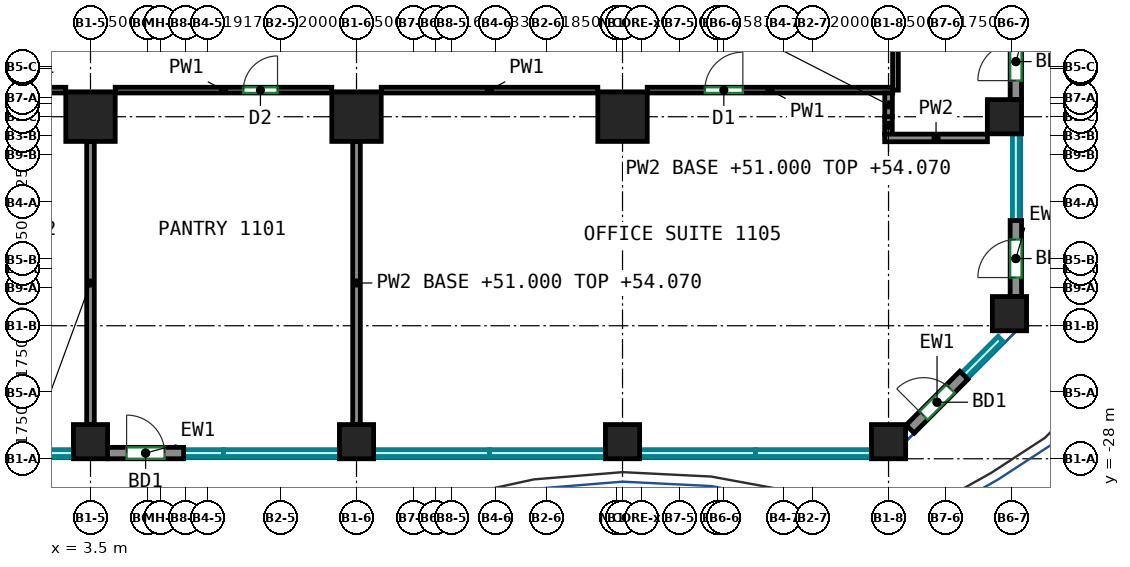
"""IFC4 building model, lengths in metres.
Left out: names, types, materials, properties, quantities, classifications, styles, units other than length and angle.
Written with IfcOpenShell. Run it as: python <this file> out.ifc"""

import sys

from ifc_helpers import new_model, si_unit, direction, frame, frame_2d, origin, origin_2d, place, context, subcontext, project, spatial, rectangle, extrude, source, transform, mapped, element, fill, save


model = new_model("IFC4")
c1 = context("Model", 3, precision=1e-05, world=origin(), true_north=direction((0.0, 1.0)))
c2 = subcontext(c1, "Body", "Model", "MODEL_VIEW")
j1 = project(units=[si_unit("LENGTHUNIT", "METRE"), si_unit("PLANEANGLEUNIT", "RADIAN")], contexts=[c1])
p1 = place(None, origin())
s1 = spatial("IfcSite", under=j1, at=p1, CompositionType="ELEMENT")
p2 = place(p1, origin())
s2 = spatial("IfcBuilding", under=s1, at=p2, CompositionType="ELEMENT")
p3 = place(p2, frame((0.0, 0.0, 51.0)))
s3 = spatial("IfcBuildingStorey", under=s2, at=p3, CompositionType="ELEMENT", Elevation=51.0)
m1 = source(origin(), c2, "Body", "SweptSolid", [
    extrude(rectangle(XDim=0.9, YDim=0.9, at=origin_2d()), origin(), (0.0, 0.0, 1.0), 3.72),
])
p4 = place(p3, frame((3.5, -27.55, 0.0), z_axis=(0.0, 0.0, 1.0), x_axis=(1.0, 0.0, 0.0)))
e1 = element("IfcColumn", 1, at=p4, inside=s3, PredefinedType="COLUMN", context=c2, shape_type="MappedRepresentation", body=[
    mapped(m1, transform((0.0, 0.0, 0.0))),
])
m2 = source(origin(), c2, "Body", "SweptSolid", [
    extrude(rectangle(XDim=1.3, YDim=1.3, at=origin_2d()), origin(), (0.0, 0.0, 1.0), 3.72),
])
p5 = place(p3, frame((3.5, -19.0, 0.0), z_axis=(0.0, 0.0, 1.0), x_axis=(1.0, 0.0, 0.0)))
e2 = element("IfcColumn", 2, at=p5, inside=s3, PredefinedType="COLUMN", context=c2, shape_type="MappedRepresentation", body=[
    mapped(m2, transform((0.0, 0.0, 0.0))),
])
p6 = place(p3, frame((10.5, -27.55, 0.0), z_axis=(0.0, 0.0, 1.0), x_axis=(1.0, 0.0, 0.0)))
e3 = element("IfcColumn", 3, at=p6, inside=s3, PredefinedType="COLUMN", context=c2, shape_type="MappedRepresentation", body=[
    mapped(m1, transform((0.0, 0.0, 0.0))),
])
p7 = place(p3, frame((10.5, -19.0, 0.0), z_axis=(0.0, 0.0, 1.0), x_axis=(1.0, 0.0, 0.0)))
e4 = element("IfcColumn", 4, at=p7, inside=s3, PredefinedType="COLUMN", context=c2, shape_type="MappedRepresentation", body=[
    mapped(m2, transform((0.0, 0.0, 0.0))),
])
p8 = place(p3, frame((17.5, -27.55, 0.0), z_axis=(0.0, 0.0, 1.0), x_axis=(1.0, 0.0, 0.0)))
e5 = element("IfcColumn", 5, at=p8, inside=s3, PredefinedType="COLUMN", context=c2, shape_type="MappedRepresentation", body=[
    mapped(m1, transform((0.0, 0.0, 0.0))),
])
p9 = place(p3, frame((17.5, -19.0, 0.0), z_axis=(0.0, 0.0, 1.0), x_axis=(1.0, 0.0, 0.0)))
e6 = element("IfcColumn", 6, at=p9, inside=s3, PredefinedType="COLUMN", context=c2, shape_type="MappedRepresentation", body=[
    mapped(m2, transform((0.0, 0.0, 0.0))),
])
for number, where, z_axis, x_axis in (
    (7, (24.5, -27.55, 0.0), (0.0, 0.0, 1.0), (1.0, 0.0, 0.0)),
    (8, (27.55, -19.0, 0.0), (0.0, 0.0, 1.0), (1.0, 0.0, 0.0)),
    (9, (27.682, -24.182, 0.0), (0.0, 0.0, 1.0), (1.0, 0.0, 0.0)),
):
    element("IfcColumn", number, at=place(p3, frame(where, z_axis=z_axis, x_axis=x_axis)), inside=s3, PredefinedType="COLUMN", context=c2, shape_type="MappedRepresentation", body=[
        mapped(m1, transform((0.0, 0.0, 0.0))),
    ])
m3 = source(origin(), c2, "Body", "SweptSolid", [
    extrude(rectangle(XDim=2.0, YDim=0.3, at=frame_2d((1.0, 0.0))), origin(), (0.0, 0.0, 1.0), 3.72),
])
p10 = place(p3, frame((3.95, -27.85, 0.0), z_axis=(0.0, 0.0, 1.0), x_axis=(1.0, 0.0, 0.0)))
e10 = element("IfcWall", 10, at=p10, inside=s3, PredefinedType="SOLIDWALL", context=c2, shape_type="MappedRepresentation", body=[
    mapped(m3, transform((0.0, 0.0, 0.0))),
])
p11 = place(p10, frame((0.5, 0.0, 0.0)))
e11 = element("IfcOpeningElement", 11, at=p11, cuts=e10, PredefinedType="OPENING", context=c2, shape_type="SweptSolid", body=[
    extrude(rectangle(XDim=1.0, YDim=2.1, at=frame_2d((0.5, 1.05))), frame((0.0, 0.16, 0.0), z_axis=(0.0, -1.0, 0.0), x_axis=(1.0, 0.0, 0.0)), (0.0, 0.0, 1.0), 0.32),
])
m4 = source(origin(), c2, "Body", "SweptSolid", [
    extrude(rectangle(XDim=2.0, YDim=0.3, at=frame_2d((1.0, 0.0))), origin(), (0.0, 0.0, 1.0), 3.72),
])
p12 = place(p3, frame((25.069, -27.219, 0.0), z_axis=(0.0, 0.0, 1.0), x_axis=(0.707106781187, 0.707106781187, 0.0)))
e12 = element("IfcWall", 12, at=p12, inside=s3, PredefinedType="SOLIDWALL", context=c2, shape_type="MappedRepresentation", body=[
    mapped(m4, transform((0.0, 0.0, 0.0))),
])
p13 = place(p12, frame((0.5, 0.0, 0.0)))
e13 = element("IfcOpeningElement", 13, at=p13, cuts=e12, PredefinedType="OPENING", context=c2, shape_type="SweptSolid", body=[
    extrude(rectangle(XDim=1.0, YDim=2.1, at=frame_2d((0.5, 1.05))), frame((0.0, 0.16, 0.0), z_axis=(0.0, -1.0, 0.0), x_axis=(1.0, 0.0, 0.0)), (0.0, 0.0, 1.0), 0.32),
])
p14 = place(p3, frame((27.85, -23.732, 0.0), z_axis=(0.0, 0.0, 1.0), x_axis=(0.0, 1.0, 0.0)))
e14 = element("IfcWall", 14, at=p14, inside=s3, PredefinedType="SOLIDWALL", context=c2, shape_type="MappedRepresentation", body=[
    mapped(m3, transform((0.0, 0.0, 0.0))),
])
p15 = place(p14, frame((0.5, 0.0, 0.0)))
e15 = element("IfcOpeningElement", 15, at=p15, cuts=e14, PredefinedType="OPENING", context=c2, shape_type="SweptSolid", body=[
    extrude(rectangle(XDim=1.0, YDim=2.1, at=frame_2d((0.5, 1.05))), frame((0.0, 0.16, 0.0), z_axis=(0.0, -1.0, 0.0), x_axis=(1.0, 0.0, 0.0)), (0.0, 0.0, 1.0), 0.32),
])
p16 = place(p3, frame((27.85, -18.55, 0.0), z_axis=(0.0, 0.0, 1.0), x_axis=(0.0, 1.0, 0.0)))
e16 = element("IfcWall", 16, at=p16, inside=s3, PredefinedType="SOLIDWALL", context=c2, shape_type="MappedRepresentation", body=[
    mapped(m3, transform((0.0, 0.0, 0.0))),
])
p17 = place(p16, frame((0.5, 0.0, 0.0)))
e17 = element("IfcOpeningElement", 17, at=p17, cuts=e16, PredefinedType="OPENING", context=c2, shape_type="SweptSolid", body=[
    extrude(rectangle(XDim=1.0, YDim=2.1, at=frame_2d((0.5, 1.05))), frame((0.0, 0.16, 0.0), z_axis=(0.0, -1.0, 0.0), x_axis=(1.0, 0.0, 0.0)), (0.0, 0.0, 1.0), 0.32),
])
p18 = place(p3, frame((-2.85, -18.3, 0.0), z_axis=(0.0, 0.0, 1.0), x_axis=(1.0, 0.0, 0.0)))
e18 = element("IfcWall", 18, at=p18, inside=s3, PredefinedType="PARTITIONING", context=c2, shape_type="SweptSolid", body=[
    extrude(rectangle(XDim=5.7, YDim=0.15, at=frame_2d((2.85, 0.0))), origin(), (0.0, 0.0, 1.0), 3.72),
])
p19 = place(p18, frame((1.837, 0.0, 0.0)))
e19 = element("IfcOpeningElement", 19, at=p19, cuts=e18, PredefinedType="OPENING", context=c2, shape_type="SweptSolid", body=[
    extrude(rectangle(XDim=0.9, YDim=2.1, at=frame_2d((0.45, 1.05))), frame((0.0, 0.085, 0.0), z_axis=(0.0, -1.0, 0.0), x_axis=(1.0, 0.0, 0.0)), (0.0, 0.0, 1.0), 0.17),
])
p20 = place(p3, frame((4.15, -18.3, 0.0), z_axis=(0.0, 0.0, 1.0), x_axis=(1.0, 0.0, 0.0)))
e20 = element("IfcWall", 20, at=p20, inside=s3, PredefinedType="PARTITIONING", context=c2, shape_type="SweptSolid", body=[
    extrude(rectangle(XDim=5.7, YDim=0.15, at=frame_2d((2.85, 0.0))), origin(), (0.0, 0.0, 1.0), 3.72),
])
p21 = place(p20, frame((3.372, 0.0, 0.0)))
e21 = element("IfcOpeningElement", 21, at=p21, cuts=e20, PredefinedType="OPENING", context=c2, shape_type="SweptSolid", body=[
    extrude(rectangle(XDim=0.9, YDim=2.1, at=frame_2d((0.45, 1.05))), frame((0.0, 0.085, 0.0), z_axis=(0.0, -1.0, 0.0), x_axis=(1.0, 0.0, 0.0)), (0.0, 0.0, 1.0), 0.17),
])
p22 = place(p3, frame((11.15, -18.3, 0.0), z_axis=(0.0, 0.0, 1.0), x_axis=(1.0, 0.0, 0.0)))
e22 = element("IfcWall", 22, at=p22, inside=s3, PredefinedType="PARTITIONING", context=c2, shape_type="SweptSolid", body=[
    extrude(rectangle(XDim=5.7, YDim=0.15, at=frame_2d((2.85, 0.0))), origin(), (0.0, 0.0, 1.0), 3.72),
])
p23 = place(p3, frame((18.15, -18.3, 0.0), z_axis=(0.0, 0.0, 1.0), x_axis=(1.0, 0.0, 0.0)))
e23 = element("IfcWall", 23, at=p23, inside=s3, PredefinedType="PARTITIONING", context=c2, shape_type="SweptSolid", body=[
    extrude(rectangle(XDim=6.46, YDim=0.15, at=frame_2d((3.23, 0.0))), origin(), (0.0, 0.0, 1.0), 3.72),
])
p24 = place(p23, frame((1.516, 0.0, 0.0)))
e24 = element("IfcOpeningElement", 24, at=p24, cuts=e23, PredefinedType="OPENING", context=c2, shape_type="SweptSolid", body=[
    extrude(rectangle(XDim=1.0, YDim=2.1, at=frame_2d((0.5, 1.05))), frame((0.0, 0.085, 0.0), z_axis=(0.0, -1.0, 0.0), x_axis=(1.0, 0.0, 0.0)), (0.0, 0.0, 1.0), 0.17),
])
p25 = place(p3, frame((24.682, -18.3, 0.0), z_axis=(0.0, 0.0, 1.0), x_axis=(0.0, 1.0, 0.0)))
e25 = element("IfcWall", 25, at=p25, inside=s3, PredefinedType="PARTITIONING", context=c2, shape_type="SweptSolid", body=[
    extrude(rectangle(XDim=2.65, YDim=0.15, at=frame_2d((1.325, 0.0))), origin(), (0.0, 0.0, 1.0), 3.72),
])
for number, where, z_axis, x_axis in (
    (26, (3.5, -27.1, 0.0), (0.0, 0.0, 1.0), (0.0, 1.0, 0.0)),
    (27, (10.5, -27.1, 0.0), (0.0, 0.0, 1.0), (0.0, 1.0, 0.0)),
):
    element("IfcWall", number, at=place(p3, frame(where, z_axis=z_axis, x_axis=x_axis)), inside=s3, PredefinedType="PARTITIONING", context=c2, shape_type="SweptSolid", body=[
        extrude(rectangle(XDim=7.45, YDim=0.2, at=frame_2d((3.725, 0.0))), origin(), (0.0, 0.0, 1.0), 3.07),
    ])
p26 = place(p3, frame((24.498, -19.458, 0.0), z_axis=(0.0, 0.0, 1.0), x_axis=(0.0, 1.0, 0.0)))
e28 = element("IfcWall", 28, at=p26, inside=s3, PredefinedType="PARTITIONING", context=c2, shape_type="SweptSolid", body=[
    extrude(rectangle(XDim=0.46, YDim=0.2, at=frame_2d((0.23, 0.0))), origin(), (0.0, 0.0, 1.0), 3.07),
])
p27 = place(p3, frame((27.102, -19.558, 0.0), z_axis=(0.0, 0.0, 1.0), x_axis=(-1.0, 0.0, 0.0)))
e29 = element("IfcWall", 29, at=p27, inside=s3, PredefinedType="PARTITIONING", context=c2, shape_type="SweptSolid", body=[
    extrude(rectangle(XDim=2.704, YDim=0.2, at=frame_2d((1.352, 0.0))), origin(), (0.0, 0.0, 1.0), 3.72),
])
p28 = place(p3, frame((24.5, -18.998, 0.0), z_axis=(0.0, 0.0, 1.0), x_axis=(0.0, 1.0, 0.0)))
e30 = element("IfcWall", 30, at=p28, inside=s3, PredefinedType="PARTITIONING", context=c2, shape_type="SweptSolid", body=[
    extrude(rectangle(XDim=0.622, YDim=0.2, at=frame_2d((0.311, 0.0))), origin(), (0.0, 0.0, 1.0), 3.07),
])
p29 = place(p11, origin())
e31 = element("IfcDoor", 31, at=p29, inside=s3, OperationType="SINGLE_SWING_LEFT", PredefinedType="DOOR", context=c2, shape_type="SweptSolid", body=[
    extrude(rectangle(XDim=1.0, YDim=2.1, at=frame_2d((0.5, 1.05))), frame((0.0, 0.025, 0.0), z_axis=(0.0, -1.0, 0.0), x_axis=(1.0, 0.0, 0.0)), (0.0, 0.0, 1.0), 0.05),
])
fill(e11, e31)
p30 = place(p13, origin())
e32 = element("IfcDoor", 32, at=p30, inside=s3, OperationType="SINGLE_SWING_LEFT", PredefinedType="DOOR", context=c2, shape_type="SweptSolid", body=[
    extrude(rectangle(XDim=1.0, YDim=2.1, at=frame_2d((0.5, 1.05))), frame((0.0, 0.025, 0.0), z_axis=(0.0, -1.0, 0.0), x_axis=(1.0, 0.0, 0.0)), (0.0, 0.0, 1.0), 0.05),
])
fill(e13, e32)
p31 = place(p15, origin())
e33 = element("IfcDoor", 33, at=p31, inside=s3, OperationType="SINGLE_SWING_LEFT", PredefinedType="DOOR", context=c2, shape_type="SweptSolid", body=[
    extrude(rectangle(XDim=1.0, YDim=2.1, at=frame_2d((0.5, 1.05))), frame((0.0, 0.025, 0.0), z_axis=(0.0, -1.0, 0.0), x_axis=(1.0, 0.0, 0.0)), (0.0, 0.0, 1.0), 0.05),
])
fill(e15, e33)
p32 = place(p17, origin())
e34 = element("IfcDoor", 34, at=p32, inside=s3, OperationType="SINGLE_SWING_LEFT", PredefinedType="DOOR", context=c2, shape_type="SweptSolid", body=[
    extrude(rectangle(XDim=1.0, YDim=2.1, at=frame_2d((0.5, 1.05))), frame((0.0, 0.025, 0.0), z_axis=(0.0, -1.0, 0.0), x_axis=(1.0, 0.0, 0.0)), (0.0, 0.0, 1.0), 0.05),
])
fill(e17, e34)
p33 = place(p21, origin())
e35 = element("IfcDoor", 35, at=p33, inside=s3, OperationType="SINGLE_SWING_RIGHT", PredefinedType="DOOR", context=c2, shape_type="SweptSolid", body=[
    extrude(rectangle(XDim=0.9, YDim=2.1, at=frame_2d((0.45, 1.05))), frame((0.0, 0.025, 0.0), z_axis=(0.0, -1.0, 0.0), x_axis=(1.0, 0.0, 0.0)), (0.0, 0.0, 1.0), 0.05),
])
fill(e21, e35)
p34 = place(p24, origin())
e36 = element("IfcDoor", 36, at=p34, inside=s3, OperationType="SINGLE_SWING_RIGHT", PredefinedType="DOOR", context=c2, shape_type="SweptSolid", body=[
    extrude(rectangle(XDim=1.0, YDim=2.1, at=frame_2d((0.5, 1.05))), frame((0.0, 0.025, 0.0), z_axis=(0.0, -1.0, 0.0), x_axis=(1.0, 0.0, 0.0)), (0.0, 0.0, 1.0), 0.05),
])
fill(e24, e36)
save(model, sys.argv[1])
